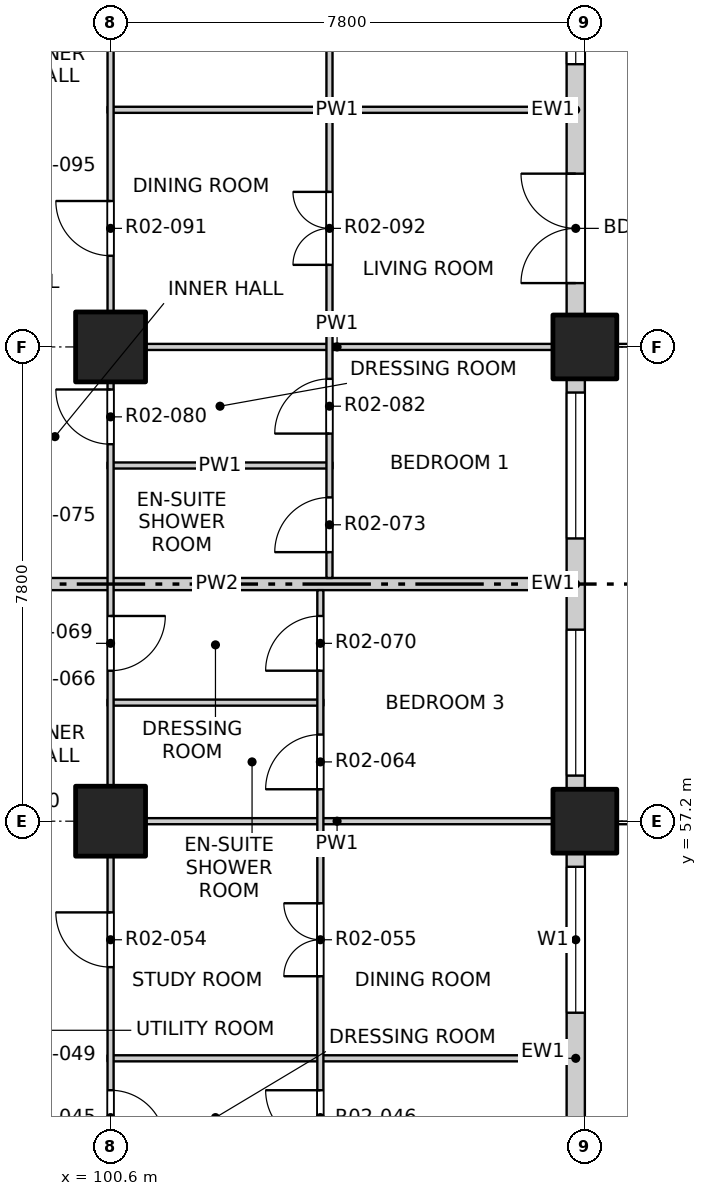
"""IFC4 building model, lengths in metres.
Left out: names, types, materials, properties, quantities, classifications, styles, units other than length and angle.
Written with IfcOpenShell. Run it as: python <this file> out.ifc"""

import sys

from ifc_helpers import new_model, si_unit, direction, frame, frame_2d, origin, origin_2d, place, context, subcontext, project, spatial, rectangle, extrude, element, fill, save


model = new_model("IFC4")
c1 = context("Model", 3, precision=1e-05, world=origin(), true_north=direction((0.0, 1.0)))
c2 = subcontext(c1, "Body", "Model", "MODEL_VIEW")
j1 = project(units=[si_unit("LENGTHUNIT", "METRE"), si_unit("PLANEANGLEUNIT", "RADIAN")], contexts=[c1])
p1 = place(None, origin())
s1 = spatial("IfcSite", under=j1, at=p1, CompositionType="ELEMENT")
p2 = place(p1, origin())
s2 = spatial("IfcBuilding", under=s1, at=p2, CompositionType="ELEMENT")
p3 = place(p2, frame((0.0, 0.0, 29.7)))
s3 = spatial("IfcBuildingStorey", under=s2, at=p3, CompositionType="ELEMENT", Elevation=29.7)
for number, where, z_axis, x_axis in (
    (1, (108.4, 57.2, -0.25), (0.0, 0.0, 1.0), (1.0, 0.0, 0.0)),
    (2, (108.4, 65.0, -0.25), (0.0, 0.0, 1.0), (1.0, 0.0, 0.0)),
):
    element("IfcColumn", number, at=place(p3, frame(where, z_axis=z_axis, x_axis=x_axis)), inside=s3, PredefinedType="COLUMN", context=c2, shape_type="SweptSolid", body=[
        extrude(rectangle(XDim=1.05, YDim=1.05, at=origin_2d()), origin(), (0.0, 0.0, 1.0), 3.4),
    ])
for number, where, z_axis, x_axis in (
    (3, (100.6, 57.2, -0.25), (0.0, 0.0, 1.0), (1.0, 0.0, 0.0)),
    (4, (100.6, 65.0, -0.25), (0.0, 0.0, 1.0), (1.0, 0.0, 0.0)),
):
    element("IfcColumn", number, at=place(p3, frame(where, z_axis=z_axis, x_axis=x_axis)), inside=s3, PredefinedType="COLUMN", context=c2, shape_type="SweptSolid", body=[
        extrude(rectangle(XDim=1.15, YDim=1.15, at=origin_2d()), origin(), (0.0, 0.0, 1.0), 3.4),
    ])
p4 = place(p3, frame((108.25, 49.925, 0.0), z_axis=(0.0, 0.0, 1.0), x_axis=(0.0, 1.0, 0.0)))
e5 = element("IfcWall", 5, at=p4, inside=s3, PredefinedType="SOLIDWALL", context=c2, shape_type="SweptSolid", body=[
    extrude(rectangle(XDim=6.75, YDim=0.3, at=frame_2d((3.375, 0.0))), origin(), (0.0, 0.0, 1.0), 2.7),
])
p5 = place(p4, frame((0.525, 0.0, 0.0)))
e6 = element("IfcOpeningElement", 6, at=p5, cuts=e5, PredefinedType="OPENING", context=c2, shape_type="SweptSolid", body=[
    extrude(rectangle(XDim=1.8, YDim=2.4, at=frame_2d((0.9, 1.2))), frame((0.0, 0.16, 0.0), z_axis=(0.0, -1.0, 0.0), x_axis=(1.0, 0.0, 0.0)), (0.0, 0.0, 1.0), 0.32),
])
p6 = place(p4, frame((4.125, 0.0, 0.9)))
e7 = element("IfcOpeningElement", 7, at=p6, cuts=e5, PredefinedType="OPENING", context=c2, shape_type="SweptSolid", body=[
    extrude(rectangle(XDim=2.4, YDim=1.8, at=frame_2d((1.2, 0.9))), frame((0.0, 0.16, 0.0), z_axis=(0.0, -1.0, 0.0), x_axis=(1.0, 0.0, 0.0)), (0.0, 0.0, 1.0), 0.32),
])
p7 = place(p3, frame((108.25, 57.725, 0.0), z_axis=(0.0, 0.0, 1.0), x_axis=(0.0, 1.0, 0.0)))
e8 = element("IfcWall", 8, at=p7, inside=s3, PredefinedType="SOLIDWALL", context=c2, shape_type="SweptSolid", body=[
    extrude(rectangle(XDim=6.75, YDim=0.3, at=frame_2d((3.375, 0.0))), origin(), (0.0, 0.0, 1.0), 2.7),
])
p8 = place(p7, frame((0.225, 0.0, 0.9)))
e9 = element("IfcOpeningElement", 9, at=p8, cuts=e8, PredefinedType="OPENING", context=c2, shape_type="SweptSolid", body=[
    extrude(rectangle(XDim=2.4, YDim=1.8, at=frame_2d((1.2, 0.9))), frame((0.0, 0.16, 0.0), z_axis=(0.0, -1.0, 0.0), x_axis=(1.0, 0.0, 0.0)), (0.0, 0.0, 1.0), 0.32),
])
p9 = place(p7, frame((4.125, 0.0, 0.9)))
e10 = element("IfcOpeningElement", 10, at=p9, cuts=e8, PredefinedType="OPENING", context=c2, shape_type="SweptSolid", body=[
    extrude(rectangle(XDim=2.4, YDim=1.8, at=frame_2d((1.2, 0.9))), frame((0.0, 0.16, 0.0), z_axis=(0.0, -1.0, 0.0), x_axis=(1.0, 0.0, 0.0)), (0.0, 0.0, 1.0), 0.32),
])
p10 = place(p3, frame((108.25, 65.525, 0.0), z_axis=(0.0, 0.0, 1.0), x_axis=(0.0, 1.0, 0.0)))
e11 = element("IfcWall", 11, at=p10, inside=s3, PredefinedType="SOLIDWALL", context=c2, shape_type="SweptSolid", body=[
    extrude(rectangle(XDim=6.75, YDim=0.3, at=frame_2d((3.375, 0.0))), origin(), (0.0, 0.0, 1.0), 2.7),
])
p11 = place(p10, frame((0.525, 0.0, 0.0)))
e12 = element("IfcOpeningElement", 12, at=p11, cuts=e11, PredefinedType="OPENING", context=c2, shape_type="SweptSolid", body=[
    extrude(rectangle(XDim=1.8, YDim=2.4, at=frame_2d((0.9, 1.2))), frame((0.0, 0.16, 0.0), z_axis=(0.0, -1.0, 0.0), x_axis=(1.0, 0.0, 0.0)), (0.0, 0.0, 1.0), 0.32),
])
p12 = place(p10, frame((4.125, 0.0, 0.9)))
e13 = element("IfcOpeningElement", 13, at=p12, cuts=e11, PredefinedType="OPENING", context=c2, shape_type="SweptSolid", body=[
    extrude(rectangle(XDim=2.4, YDim=1.8, at=frame_2d((1.2, 0.9))), frame((0.0, 0.16, 0.0), z_axis=(0.0, -1.0, 0.0), x_axis=(1.0, 0.0, 0.0)), (0.0, 0.0, 1.0), 0.32),
])
p13 = place(p3, frame((100.55, 53.3, 0.0), z_axis=(0.0, 0.0, 1.0), x_axis=(1.0, 0.0, 0.0)))
e14 = element("IfcWall", 14, at=p13, inside=s3, PredefinedType="PARTITIONING", context=c2, shape_type="SweptSolid", body=[
    extrude(rectangle(XDim=7.55, YDim=0.1, at=frame_2d((3.775, 0.0))), origin(), (0.0, 0.0, 1.0), 3.15),
])
p14 = place(p3, frame((100.55, 57.2, 0.0), z_axis=(0.0, 0.0, 1.0), x_axis=(1.0, 0.0, 0.0)))
e15 = element("IfcWall", 15, at=p14, inside=s3, PredefinedType="PARTITIONING", context=c2, shape_type="SweptSolid", body=[
    extrude(rectangle(XDim=7.55, YDim=0.1, at=frame_2d((3.775, 0.0))), origin(), (0.0, 0.0, 1.0), 2.55),
])
p15 = place(p3, frame((100.55, 59.15, 0.0), z_axis=(0.0, 0.0, 1.0), x_axis=(1.0, 0.0, 0.0)))
e16 = element("IfcWall", 16, at=p15, inside=s3, PredefinedType="PARTITIONING", context=c2, shape_type="SweptSolid", body=[
    extrude(rectangle(XDim=3.55, YDim=0.1, at=frame_2d((1.775, 0.0))), origin(), (0.0, 0.0, 1.0), 3.15),
])
p16 = place(p3, frame((96.6, 61.1, 0.0), z_axis=(0.0, 0.0, 1.0), x_axis=(1.0, 0.0, 0.0)))
e17 = element("IfcWall", 17, at=p16, inside=s3, PredefinedType="PARTITIONING", context=c2, shape_type="SweptSolid", body=[
    extrude(rectangle(XDim=11.5, YDim=0.2, at=frame_2d((5.75, 0.0))), origin(), (0.0, 0.0, 1.0), 3.15),
])
p17 = place(p3, frame((100.55, 63.05, 0.0), z_axis=(0.0, 0.0, 1.0), x_axis=(1.0, 0.0, 0.0)))
e18 = element("IfcWall", 18, at=p17, inside=s3, PredefinedType="PARTITIONING", context=c2, shape_type="SweptSolid", body=[
    extrude(rectangle(XDim=3.7, YDim=0.1, at=frame_2d((1.85, 0.0))), origin(), (0.0, 0.0, 1.0), 3.15),
])
p18 = place(p3, frame((100.55, 65.0, 0.0), z_axis=(0.0, 0.0, 1.0), x_axis=(1.0, 0.0, 0.0)))
e19 = element("IfcWall", 19, at=p18, inside=s3, PredefinedType="PARTITIONING", context=c2, shape_type="SweptSolid", body=[
    extrude(rectangle(XDim=7.55, YDim=0.1, at=frame_2d((3.775, 0.0))), origin(), (0.0, 0.0, 1.0), 2.55),
])
p19 = place(p3, frame((100.55, 68.9, 0.0), z_axis=(0.0, 0.0, 1.0), x_axis=(1.0, 0.0, 0.0)))
e20 = element("IfcWall", 20, at=p19, inside=s3, PredefinedType="PARTITIONING", context=c2, shape_type="SweptSolid", body=[
    extrude(rectangle(XDim=7.55, YDim=0.1, at=frame_2d((3.775, 0.0))), origin(), (0.0, 0.0, 1.0), 3.15),
])
p20 = place(p3, frame((100.6, 49.4, 0.0), z_axis=(0.0, 0.0, 1.0), x_axis=(0.0, 1.0, 0.0)))
e21 = element("IfcWall", 21, at=p20, inside=s3, PredefinedType="PARTITIONING", context=c2, shape_type="SweptSolid", body=[
    extrude(rectangle(XDim=31.2, YDim=0.1, at=frame_2d((15.6, 0.0))), origin(), (0.0, 0.0, 1.0), 3.15),
])
p21 = place(p20, frame((2.475, 0.0, 0.0)))
e22 = element("IfcOpeningElement", 22, at=p21, cuts=e21, PredefinedType="OPENING", context=c2, shape_type="SweptSolid", body=[
    extrude(rectangle(XDim=0.9, YDim=2.1, at=frame_2d((0.45, 1.05))), frame((0.0, 0.06, 0.0), z_axis=(0.0, -1.0, 0.0), x_axis=(1.0, 0.0, 0.0)), (0.0, 0.0, 1.0), 0.12),
])
p22 = place(p20, frame((5.4, 0.0, 0.0)))
e23 = element("IfcOpeningElement", 23, at=p22, cuts=e21, PredefinedType="OPENING", context=c2, shape_type="SweptSolid", body=[
    extrude(rectangle(XDim=0.9, YDim=2.1, at=frame_2d((0.45, 1.05))), frame((0.0, 0.06, 0.0), z_axis=(0.0, -1.0, 0.0), x_axis=(1.0, 0.0, 0.0)), (0.0, 0.0, 1.0), 0.12),
])
p23 = place(p20, frame((10.275, 0.0, 0.0)))
e24 = element("IfcOpeningElement", 24, at=p23, cuts=e21, PredefinedType="OPENING", context=c2, shape_type="SweptSolid", body=[
    extrude(rectangle(XDim=0.9, YDim=2.1, at=frame_2d((0.45, 1.05))), frame((0.0, 0.06, 0.0), z_axis=(0.0, -1.0, 0.0), x_axis=(1.0, 0.0, 0.0)), (0.0, 0.0, 1.0), 0.12),
])
p24 = place(p20, frame((14.0, 0.0, 0.0)))
e25 = element("IfcOpeningElement", 25, at=p24, cuts=e21, PredefinedType="OPENING", context=c2, shape_type="SweptSolid", body=[
    extrude(rectangle(XDim=0.9, YDim=2.1, at=frame_2d((0.45, 1.05))), frame((0.0, 0.06, 0.0), z_axis=(0.0, -1.0, 0.0), x_axis=(1.0, 0.0, 0.0)), (0.0, 0.0, 1.0), 0.12),
])
p25 = place(p20, frame((17.1, 0.0, 0.0)))
e26 = element("IfcOpeningElement", 26, at=p25, cuts=e21, PredefinedType="OPENING", context=c2, shape_type="SweptSolid", body=[
    extrude(rectangle(XDim=0.9, YDim=2.1, at=frame_2d((0.45, 1.05))), frame((0.0, 0.06, 0.0), z_axis=(0.0, -1.0, 0.0), x_axis=(1.0, 0.0, 0.0)), (0.0, 0.0, 1.0), 0.12),
])
p26 = place(p20, frame((21.0, 0.0, 0.0)))
e27 = element("IfcOpeningElement", 27, at=p26, cuts=e21, PredefinedType="OPENING", context=c2, shape_type="SweptSolid", body=[
    extrude(rectangle(XDim=0.9, YDim=2.1, at=frame_2d((0.45, 1.05))), frame((0.0, 0.06, 0.0), z_axis=(0.0, -1.0, 0.0), x_axis=(1.0, 0.0, 0.0)), (0.0, 0.0, 1.0), 0.12),
])
p27 = place(p20, frame((25.875, 0.0, 0.0)))
e28 = element("IfcOpeningElement", 28, at=p27, cuts=e21, PredefinedType="OPENING", context=c2, shape_type="SweptSolid", body=[
    extrude(rectangle(XDim=0.9, YDim=2.1, at=frame_2d((0.45, 1.05))), frame((0.0, 0.06, 0.0), z_axis=(0.0, -1.0, 0.0), x_axis=(1.0, 0.0, 0.0)), (0.0, 0.0, 1.0), 0.12),
])
p28 = place(p20, frame((29.6, 0.0, 0.0)))
e29 = element("IfcOpeningElement", 29, at=p28, cuts=e21, PredefinedType="OPENING", context=c2, shape_type="SweptSolid", body=[
    extrude(rectangle(XDim=0.9, YDim=2.1, at=frame_2d((0.45, 1.05))), frame((0.0, 0.06, 0.0), z_axis=(0.0, -1.0, 0.0), x_axis=(1.0, 0.0, 0.0)), (0.0, 0.0, 1.0), 0.12),
])
p29 = place(p3, frame((104.05, 41.9, 0.0), z_axis=(0.0, 0.0, 1.0), x_axis=(0.0, 1.0, 0.0)))
e30 = element("IfcWall", 30, at=p29, inside=s3, PredefinedType="PARTITIONING", context=c2, shape_type="SweptSolid", body=[
    extrude(rectangle(XDim=19.1, YDim=0.1, at=frame_2d((9.55, 0.0))), origin(), (0.0, 0.0, 1.0), 3.15),
])
p30 = place(p29, frame((1.05, 0.0, 0.0)))
e31 = element("IfcOpeningElement", 31, at=p30, cuts=e30, PredefinedType="OPENING", context=c2, shape_type="SweptSolid", body=[
    extrude(rectangle(XDim=1.2, YDim=2.1, at=frame_2d((0.6, 1.05))), frame((0.0, 0.06, 0.0), z_axis=(0.0, -1.0, 0.0), x_axis=(1.0, 0.0, 0.0)), (0.0, 0.0, 1.0), 0.12),
])
p31 = place(p29, frame((4.95, 0.0, 0.0)))
e32 = element("IfcOpeningElement", 32, at=p31, cuts=e30, PredefinedType="OPENING", context=c2, shape_type="SweptSolid", body=[
    extrude(rectangle(XDim=1.2, YDim=2.1, at=frame_2d((0.6, 1.05))), frame((0.0, 0.06, 0.0), z_axis=(0.0, -1.0, 0.0), x_axis=(1.0, 0.0, 0.0)), (0.0, 0.0, 1.0), 0.12),
])
p32 = place(p29, frame((8.025, 0.0, 0.0)))
e33 = element("IfcOpeningElement", 33, at=p32, cuts=e30, PredefinedType="OPENING", context=c2, shape_type="SweptSolid", body=[
    extrude(rectangle(XDim=0.9, YDim=2.1, at=frame_2d((0.45, 1.05))), frame((0.0, 0.06, 0.0), z_axis=(0.0, -1.0, 0.0), x_axis=(1.0, 0.0, 0.0)), (0.0, 0.0, 1.0), 0.12),
])
p33 = place(p29, frame((9.975, 0.0, 0.0)))
e34 = element("IfcOpeningElement", 34, at=p33, cuts=e30, PredefinedType="OPENING", context=c2, shape_type="SweptSolid", body=[
    extrude(rectangle(XDim=0.9, YDim=2.1, at=frame_2d((0.45, 1.05))), frame((0.0, 0.06, 0.0), z_axis=(0.0, -1.0, 0.0), x_axis=(1.0, 0.0, 0.0)), (0.0, 0.0, 1.0), 0.12),
])
p34 = place(p29, frame((12.75, 0.0, 0.0)))
e35 = element("IfcOpeningElement", 35, at=p34, cuts=e30, PredefinedType="OPENING", context=c2, shape_type="SweptSolid", body=[
    extrude(rectangle(XDim=1.2, YDim=2.1, at=frame_2d((0.6, 1.05))), frame((0.0, 0.06, 0.0), z_axis=(0.0, -1.0, 0.0), x_axis=(1.0, 0.0, 0.0)), (0.0, 0.0, 1.0), 0.12),
])
p35 = place(p29, frame((15.825, 0.0, 0.0)))
e36 = element("IfcOpeningElement", 36, at=p35, cuts=e30, PredefinedType="OPENING", context=c2, shape_type="SweptSolid", body=[
    extrude(rectangle(XDim=0.9, YDim=2.1, at=frame_2d((0.45, 1.05))), frame((0.0, 0.06, 0.0), z_axis=(0.0, -1.0, 0.0), x_axis=(1.0, 0.0, 0.0)), (0.0, 0.0, 1.0), 0.12),
])
p36 = place(p29, frame((17.775, 0.0, 0.0)))
e37 = element("IfcOpeningElement", 37, at=p36, cuts=e30, PredefinedType="OPENING", context=c2, shape_type="SweptSolid", body=[
    extrude(rectangle(XDim=0.9, YDim=2.1, at=frame_2d((0.45, 1.05))), frame((0.0, 0.06, 0.0), z_axis=(0.0, -1.0, 0.0), x_axis=(1.0, 0.0, 0.0)), (0.0, 0.0, 1.0), 0.12),
])
p37 = place(p3, frame((104.2, 61.2, 0.0), z_axis=(0.0, 0.0, 1.0), x_axis=(0.0, 1.0, 0.0)))
e38 = element("IfcWall", 38, at=p37, inside=s3, PredefinedType="PARTITIONING", context=c2, shape_type="SweptSolid", body=[
    extrude(rectangle(XDim=11.5, YDim=0.1, at=frame_2d((5.75, 0.0))), origin(), (0.0, 0.0, 1.0), 3.15),
])
p38 = place(p37, frame((0.425, 0.0, 0.0)))
e39 = element("IfcOpeningElement", 39, at=p38, cuts=e38, PredefinedType="OPENING", context=c2, shape_type="SweptSolid", body=[
    extrude(rectangle(XDim=0.9, YDim=2.1, at=frame_2d((0.45, 1.05))), frame((0.0, 0.06, 0.0), z_axis=(0.0, -1.0, 0.0), x_axis=(1.0, 0.0, 0.0)), (0.0, 0.0, 1.0), 0.12),
])
p39 = place(p37, frame((2.375, 0.0, 0.0)))
e40 = element("IfcOpeningElement", 40, at=p39, cuts=e38, PredefinedType="OPENING", context=c2, shape_type="SweptSolid", body=[
    extrude(rectangle(XDim=0.9, YDim=2.1, at=frame_2d((0.45, 1.05))), frame((0.0, 0.06, 0.0), z_axis=(0.0, -1.0, 0.0), x_axis=(1.0, 0.0, 0.0)), (0.0, 0.0, 1.0), 0.12),
])
p40 = place(p37, frame((5.15, 0.0, 0.0)))
e41 = element("IfcOpeningElement", 41, at=p40, cuts=e38, PredefinedType="OPENING", context=c2, shape_type="SweptSolid", body=[
    extrude(rectangle(XDim=1.2, YDim=2.1, at=frame_2d((0.6, 1.05))), frame((0.0, 0.06, 0.0), z_axis=(0.0, -1.0, 0.0), x_axis=(1.0, 0.0, 0.0)), (0.0, 0.0, 1.0), 0.12),
])
p41 = place(p37, frame((9.05, 0.0, 0.0)))
e42 = element("IfcOpeningElement", 42, at=p41, cuts=e38, PredefinedType="OPENING", context=c2, shape_type="SweptSolid", body=[
    extrude(rectangle(XDim=1.2, YDim=2.1, at=frame_2d((0.6, 1.05))), frame((0.0, 0.06, 0.0), z_axis=(0.0, -1.0, 0.0), x_axis=(1.0, 0.0, 0.0)), (0.0, 0.0, 1.0), 0.12),
])
p42 = place(p6, origin())
e43 = element("IfcWindow", 43, at=p42, inside=s3, PartitioningType="DOUBLE_PANEL_VERTICAL", PredefinedType="WINDOW", context=c2, shape_type="SweptSolid", body=[
    extrude(rectangle(XDim=2.4, YDim=1.8, at=frame_2d((1.2, 0.9))), frame((0.0, 0.03, 0.0), z_axis=(0.0, -1.0, 0.0), x_axis=(1.0, 0.0, 0.0)), (0.0, 0.0, 1.0), 0.06),
])
fill(e7, e43)
p43 = place(p8, origin())
e44 = element("IfcWindow", 44, at=p43, inside=s3, PartitioningType="DOUBLE_PANEL_VERTICAL", PredefinedType="WINDOW", context=c2, shape_type="SweptSolid", body=[
    extrude(rectangle(XDim=2.4, YDim=1.8, at=frame_2d((1.2, 0.9))), frame((0.0, 0.03, 0.0), z_axis=(0.0, -1.0, 0.0), x_axis=(1.0, 0.0, 0.0)), (0.0, 0.0, 1.0), 0.06),
])
fill(e9, e44)
p44 = place(p9, origin())
e45 = element("IfcWindow", 45, at=p44, inside=s3, PartitioningType="DOUBLE_PANEL_VERTICAL", PredefinedType="WINDOW", context=c2, shape_type="SweptSolid", body=[
    extrude(rectangle(XDim=2.4, YDim=1.8, at=frame_2d((1.2, 0.9))), frame((0.0, 0.03, 0.0), z_axis=(0.0, -1.0, 0.0), x_axis=(1.0, 0.0, 0.0)), (0.0, 0.0, 1.0), 0.06),
])
fill(e10, e45)
p45 = place(p11, origin())
e46 = element("IfcDoor", 46, at=p45, inside=s3, OperationType="DOUBLE_DOOR_SINGLE_SWING", PredefinedType="DOOR", context=c2, shape_type="SweptSolid", body=[
    extrude(rectangle(XDim=1.8, YDim=2.4, at=frame_2d((0.9, 1.2))), frame((0.0, 0.025, 0.0), z_axis=(0.0, -1.0, 0.0), x_axis=(1.0, 0.0, 0.0)), (0.0, 0.0, 1.0), 0.05),
])
fill(e12, e46)
p46 = place(p12, origin())
e47 = element("IfcWindow", 47, at=p46, inside=s3, PartitioningType="DOUBLE_PANEL_VERTICAL", PredefinedType="WINDOW", context=c2, shape_type="SweptSolid", body=[
    extrude(rectangle(XDim=2.4, YDim=1.8, at=frame_2d((1.2, 0.9))), frame((0.0, 0.03, 0.0), z_axis=(0.0, -1.0, 0.0), x_axis=(1.0, 0.0, 0.0)), (0.0, 0.0, 1.0), 0.06),
])
fill(e13, e47)
p47 = place(p21, origin())
e48 = element("IfcDoor", 48, at=p47, inside=s3, OperationType="SINGLE_SWING_RIGHT", PredefinedType="DOOR", context=c2, shape_type="SweptSolid", body=[
    extrude(rectangle(XDim=0.9, YDim=2.1, at=frame_2d((0.45, 1.05))), frame((0.0, 0.025, 0.0), z_axis=(0.0, -1.0, 0.0), x_axis=(1.0, 0.0, 0.0)), (0.0, 0.0, 1.0), 0.05),
])
fill(e22, e48)
p48 = place(p33, origin())
e49 = element("IfcDoor", 49, at=p48, inside=s3, OperationType="SINGLE_SWING_RIGHT", PredefinedType="DOOR", context=c2, shape_type="SweptSolid", body=[
    extrude(rectangle(XDim=0.9, YDim=2.1, at=frame_2d((0.45, 1.05))), frame((0.0, 0.025, 0.0), z_axis=(0.0, -1.0, 0.0), x_axis=(1.0, 0.0, 0.0)), (0.0, 0.0, 1.0), 0.05),
])
fill(e34, e49)
p49 = place(p22, origin())
e50 = element("IfcDoor", 50, at=p49, inside=s3, OperationType="SINGLE_SWING_RIGHT", PredefinedType="DOOR", context=c2, shape_type="SweptSolid", body=[
    extrude(rectangle(XDim=0.9, YDim=2.1, at=frame_2d((0.45, 1.05))), frame((0.0, 0.025, 0.0), z_axis=(0.0, -1.0, 0.0), x_axis=(1.0, 0.0, 0.0)), (0.0, 0.0, 1.0), 0.05),
])
fill(e23, e50)
p50 = place(p34, origin())
e51 = element("IfcDoor", 51, at=p50, inside=s3, OperationType="DOUBLE_DOOR_SINGLE_SWING", PredefinedType="DOOR", context=c2, shape_type="SweptSolid", body=[
    extrude(rectangle(XDim=1.2, YDim=2.1, at=frame_2d((0.6, 1.05))), frame((0.0, 0.025, 0.0), z_axis=(0.0, -1.0, 0.0), x_axis=(1.0, 0.0, 0.0)), (0.0, 0.0, 1.0), 0.05),
])
fill(e35, e51)
p51 = place(p35, origin())
e52 = element("IfcDoor", 52, at=p51, inside=s3, OperationType="SINGLE_SWING_LEFT", PredefinedType="DOOR", context=c2, shape_type="SweptSolid", body=[
    extrude(rectangle(XDim=0.9, YDim=2.1, at=frame_2d((0.45, 1.05))), frame((0.0, 0.025, 0.0), z_axis=(0.0, -1.0, 0.0), x_axis=(1.0, 0.0, 0.0)), (0.0, 0.0, 1.0), 0.05),
])
fill(e36, e52)
p52 = place(p23, origin())
e53 = element("IfcDoor", 53, at=p52, inside=s3, OperationType="SINGLE_SWING_LEFT", PredefinedType="DOOR", context=c2, shape_type="SweptSolid", body=[
    extrude(rectangle(XDim=0.9, YDim=2.1, at=frame_2d((0.45, 1.05))), frame((0.0, 0.025, 0.0), z_axis=(0.0, -1.0, 0.0), x_axis=(1.0, 0.0, 0.0)), (0.0, 0.0, 1.0), 0.05),
])
fill(e24, e53)
p53 = place(p36, origin())
e54 = element("IfcDoor", 54, at=p53, inside=s3, OperationType="SINGLE_SWING_LEFT", PredefinedType="DOOR", context=c2, shape_type="SweptSolid", body=[
    extrude(rectangle(XDim=0.9, YDim=2.1, at=frame_2d((0.45, 1.05))), frame((0.0, 0.025, 0.0), z_axis=(0.0, -1.0, 0.0), x_axis=(1.0, 0.0, 0.0)), (0.0, 0.0, 1.0), 0.05),
])
fill(e37, e54)
p54 = place(p38, origin())
e55 = element("IfcDoor", 55, at=p54, inside=s3, OperationType="SINGLE_SWING_LEFT", PredefinedType="DOOR", context=c2, shape_type="SweptSolid", body=[
    extrude(rectangle(XDim=0.9, YDim=2.1, at=frame_2d((0.45, 1.05))), frame((0.0, 0.025, 0.0), z_axis=(0.0, -1.0, 0.0), x_axis=(1.0, 0.0, 0.0)), (0.0, 0.0, 1.0), 0.05),
])
fill(e39, e55)
p55 = place(p24, origin())
e56 = element("IfcDoor", 56, at=p55, inside=s3, OperationType="SINGLE_SWING_RIGHT", PredefinedType="DOOR", context=c2, shape_type="SweptSolid", body=[
    extrude(rectangle(XDim=0.9, YDim=2.1, at=frame_2d((0.45, 1.05))), frame((0.0, 0.025, 0.0), z_axis=(0.0, -1.0, 0.0), x_axis=(1.0, 0.0, 0.0)), (0.0, 0.0, 1.0), 0.05),
])
fill(e25, e56)
p56 = place(p39, origin())
e57 = element("IfcDoor", 57, at=p56, inside=s3, OperationType="SINGLE_SWING_LEFT", PredefinedType="DOOR", context=c2, shape_type="SweptSolid", body=[
    extrude(rectangle(XDim=0.9, YDim=2.1, at=frame_2d((0.45, 1.05))), frame((0.0, 0.025, 0.0), z_axis=(0.0, -1.0, 0.0), x_axis=(1.0, 0.0, 0.0)), (0.0, 0.0, 1.0), 0.05),
])
fill(e40, e57)
p57 = place(p25, origin())
e58 = element("IfcDoor", 58, at=p57, inside=s3, OperationType="SINGLE_SWING_RIGHT", PredefinedType="DOOR", context=c2, shape_type="SweptSolid", body=[
    extrude(rectangle(XDim=0.9, YDim=2.1, at=frame_2d((0.45, 1.05))), frame((0.0, 0.025, 0.0), z_axis=(0.0, -1.0, 0.0), x_axis=(1.0, 0.0, 0.0)), (0.0, 0.0, 1.0), 0.05),
])
fill(e26, e58)
p58 = place(p40, origin())
e59 = element("IfcDoor", 59, at=p58, inside=s3, OperationType="DOUBLE_DOOR_SINGLE_SWING", PredefinedType="DOOR", context=c2, shape_type="SweptSolid", body=[
    extrude(rectangle(XDim=1.2, YDim=2.1, at=frame_2d((0.6, 1.05))), frame((0.0, 0.025, 0.0), z_axis=(0.0, -1.0, 0.0), x_axis=(1.0, 0.0, 0.0)), (0.0, 0.0, 1.0), 0.05),
])
fill(e41, e59)
save(model, sys.argv[1])
